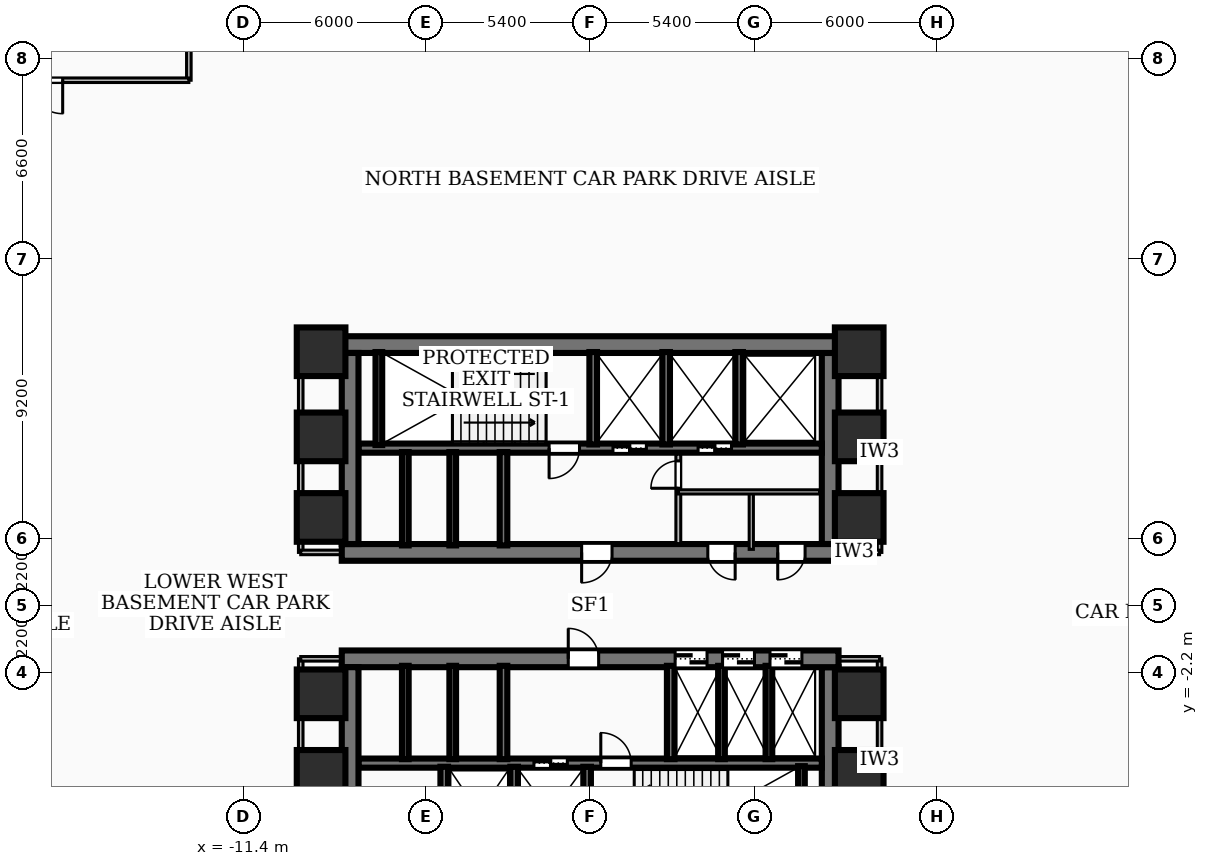
"""IFC4 building model, lengths in metres.
Left out: names, types, materials, properties, quantities, classifications, styles, units other than length and angle.
Written with IfcOpenShell. Run it as: python <this file> out.ifc"""

import sys

from ifc_helpers import new_model, si_unit, direction, frame, frame_2d, origin, origin_2d, place, context, subcontext, project, spatial, rectangle, extrude, element, fill, save


model = new_model("IFC4")
c1 = context("Model", 3, precision=1e-05, world=origin(), true_north=direction((0.0, 1.0)))
c2 = subcontext(c1, "Body", "Model", "MODEL_VIEW")
j1 = project(units=[si_unit("LENGTHUNIT", "METRE"), si_unit("PLANEANGLEUNIT", "RADIAN")], contexts=[c1])
p1 = place(None, origin())
s1 = spatial("IfcSite", under=j1, at=p1, CompositionType="ELEMENT")
p2 = place(p1, origin())
s2 = spatial("IfcBuilding", under=s1, at=p2, CompositionType="ELEMENT")
p3 = place(p2, frame((0.0, 0.0, -4.5)))
s3 = spatial("IfcBuildingStorey", under=s2, at=p3, CompositionType="ELEMENT", Elevation=-4.5)
p4 = place(p3, frame((-8.78, 8.585, 0.0), z_axis=(0.0, 0.0, 1.0), x_axis=(1.0, 0.0, 0.0)))
e1 = element("IfcWall", 1, at=p4, inside=s3, PredefinedType="SHEAR", context=c2, shape_type="SweptSolid", body=[
    extrude(rectangle(XDim=17.56, YDim=0.55, at=frame_2d((8.78, 0.0))), origin(), (0.0, 0.0, 1.0), 4.18),
])
p5 = place(p3, frame((8.17, 1.75, 0.0), z_axis=(0.0, 0.0, 1.0), x_axis=(-1.0, 0.0, 0.0)))
e2 = element("IfcWall", 2, at=p5, inside=s3, PredefinedType="SHEAR", context=c2, shape_type="SweptSolid", body=[
    extrude(rectangle(XDim=16.34, YDim=0.55, at=frame_2d((8.17, 0.0))), origin(), (0.0, 0.0, 1.0), 4.18),
])
p6 = place(p5, frame((7.45, 0.0, 0.0)))
e3 = element("IfcOpeningElement", 3, at=p6, cuts=e2, PredefinedType="OPENING", context=c2, shape_type="SweptSolid", body=[
    extrude(rectangle(XDim=1.0, YDim=2.1, at=frame_2d((0.5, 1.05))), frame((0.0, 0.285, 0.0), z_axis=(0.0, -1.0, 0.0), x_axis=(1.0, 0.0, 0.0)), (0.0, 0.0, 1.0), 0.57),
])
p7 = place(p5, frame((3.4, 0.0, 0.0)))
e4 = element("IfcOpeningElement", 4, at=p7, cuts=e2, PredefinedType="OPENING", context=c2, shape_type="SweptSolid", body=[
    extrude(rectangle(XDim=0.9, YDim=2.06, at=frame_2d((0.45, 1.03))), frame((0.0, 0.285, 0.0), z_axis=(0.0, -1.0, 0.0), x_axis=(1.0, 0.0, 0.0)), (0.0, 0.0, 1.0), 0.57),
])
p8 = place(p5, frame((1.1, 0.0, 0.0)))
e5 = element("IfcOpeningElement", 5, at=p8, cuts=e2, PredefinedType="OPENING", context=c2, shape_type="SweptSolid", body=[
    extrude(rectangle(XDim=0.9, YDim=2.06, at=frame_2d((0.45, 1.03))), frame((0.0, 0.285, 0.0), z_axis=(0.0, -1.0, 0.0), x_axis=(1.0, 0.0, 0.0)), (0.0, 0.0, 1.0), 0.57),
])
for number, where, z_axis, x_axis in (
    (6, (-7.895, 2.025, 0.0), (0.0, 0.0, 1.0), (0.0, 1.0, 0.0)),
    (7, (7.895, 8.31, 0.0), (0.0, 0.0, 1.0), (0.0, -1.0, 0.0)),
):
    element("IfcWall", number, at=place(p3, frame(where, z_axis=z_axis, x_axis=x_axis)), inside=s3, PredefinedType="SHEAR", context=c2, shape_type="SweptSolid", body=[
        extrude(rectangle(XDim=6.285, YDim=0.55, at=frame_2d((3.143, 0.0))), origin(), (0.0, 0.0, 1.0), 4.18),
    ])
p9 = place(p3, frame((7.62, 5.18, 0.0), z_axis=(0.0, 0.0, 1.0), x_axis=(-1.0, 0.0, 0.0)))
e8 = element("IfcWall", 8, at=p9, inside=s3, PredefinedType="SOLIDWALL", context=c2, shape_type="SweptSolid", body=[
    extrude(rectangle(XDim=15.24, YDim=0.3, at=frame_2d((7.62, 0.0))), origin(), (0.0, 0.0, 1.0), 4.18),
])
p10 = place(p9, frame((5.77, 0.0, 0.0)))
e9 = element("IfcOpeningElement", 9, at=p10, cuts=e8, PredefinedType="OPENING", context=c2, shape_type="SweptSolid", body=[
    extrude(rectangle(XDim=1.1, YDim=2.15, at=frame_2d((0.55, 1.075))), frame((0.0, 0.16, 0.0), z_axis=(0.0, -1.0, 0.0), x_axis=(1.0, 0.0, 0.0)), (0.0, 0.0, 1.0), 0.32),
])
p11 = place(p9, frame((2.97, 0.0, 0.0)))
e10 = element("IfcOpeningElement", 10, at=p11, cuts=e8, PredefinedType="OPENING", context=c2, shape_type="SweptSolid", body=[
    extrude(rectangle(XDim=1.1, YDim=2.15, at=frame_2d((0.55, 1.075))), frame((0.0, 0.16, 0.0), z_axis=(0.0, -1.0, 0.0), x_axis=(1.0, 0.0, 0.0)), (0.0, 0.0, 1.0), 0.32),
])
p12 = place(p9, frame((7.97, 0.0, 0.0)))
e11 = element("IfcOpeningElement", 11, at=p12, cuts=e8, PredefinedType="OPENING", context=c2, shape_type="SweptSolid", body=[
    extrude(rectangle(XDim=1.0, YDim=2.1, at=frame_2d((0.5, 1.05))), frame((0.0, 0.16, 0.0), z_axis=(0.0, -1.0, 0.0), x_axis=(1.0, 0.0, 0.0)), (0.0, 0.0, 1.0), 0.32),
])
p13 = place(p3, frame((-8.17, -1.75, 0.0), z_axis=(0.0, 0.0, 1.0), x_axis=(1.0, 0.0, 0.0)))
e12 = element("IfcWall", 12, at=p13, inside=s3, PredefinedType="SHEAR", context=c2, shape_type="SweptSolid", body=[
    extrude(rectangle(XDim=16.34, YDim=0.55, at=frame_2d((8.17, 0.0))), origin(), (0.0, 0.0, 1.0), 4.18),
])
p14 = place(p13, frame((7.45, 0.0, 0.0)))
e13 = element("IfcOpeningElement", 13, at=p14, cuts=e12, PredefinedType="OPENING", context=c2, shape_type="SweptSolid", body=[
    extrude(rectangle(XDim=1.0, YDim=2.1, at=frame_2d((0.5, 1.05))), frame((0.0, 0.285, 0.0), z_axis=(0.0, -1.0, 0.0), x_axis=(1.0, 0.0, 0.0)), (0.0, 0.0, 1.0), 0.57),
])
p15 = place(p13, frame((10.965, 0.0, 0.0)))
e14 = element("IfcOpeningElement", 14, at=p15, cuts=e12, PredefinedType="OPENING", context=c2, shape_type="SweptSolid", body=[
    extrude(rectangle(XDim=1.05, YDim=2.15, at=frame_2d((0.525, 1.075))), frame((0.0, 0.285, 0.0), z_axis=(0.0, -1.0, 0.0), x_axis=(1.0, 0.0, 0.0)), (0.0, 0.0, 1.0), 0.57),
])
p16 = place(p13, frame((12.525, 0.0, 0.0)))
e15 = element("IfcOpeningElement", 15, at=p16, cuts=e12, PredefinedType="OPENING", context=c2, shape_type="SweptSolid", body=[
    extrude(rectangle(XDim=1.05, YDim=2.15, at=frame_2d((0.525, 1.075))), frame((0.0, 0.285, 0.0), z_axis=(0.0, -1.0, 0.0), x_axis=(1.0, 0.0, 0.0)), (0.0, 0.0, 1.0), 0.57),
])
p17 = place(p13, frame((14.085, 0.0, 0.0)))
e16 = element("IfcOpeningElement", 16, at=p17, cuts=e12, PredefinedType="OPENING", context=c2, shape_type="SweptSolid", body=[
    extrude(rectangle(XDim=1.05, YDim=2.15, at=frame_2d((0.525, 1.075))), frame((0.0, 0.285, 0.0), z_axis=(0.0, -1.0, 0.0), x_axis=(1.0, 0.0, 0.0)), (0.0, 0.0, 1.0), 0.57),
])
for number, where, z_axis, x_axis in (
    (17, (-7.895, -8.31, 0.0), (0.0, 0.0, 1.0), (0.0, 1.0, 0.0)),
    (18, (7.895, -2.025, 0.0), (0.0, 0.0, 1.0), (0.0, -1.0, 0.0)),
):
    element("IfcWall", number, at=place(p3, frame(where, z_axis=z_axis, x_axis=x_axis)), inside=s3, PredefinedType="SHEAR", context=c2, shape_type="SweptSolid", body=[
        extrude(rectangle(XDim=6.285, YDim=0.55, at=frame_2d((3.143, 0.0))), origin(), (0.0, 0.0, 1.0), 4.18),
    ])
p18 = place(p3, frame((-7.62, -5.18, 0.0), z_axis=(0.0, 0.0, 1.0), x_axis=(1.0, 0.0, 0.0)))
e19 = element("IfcWall", 19, at=p18, inside=s3, PredefinedType="SOLIDWALL", context=c2, shape_type="SweptSolid", body=[
    extrude(rectangle(XDim=15.24, YDim=0.3, at=frame_2d((7.62, 0.0))), origin(), (0.0, 0.0, 1.0), 4.18),
])
p19 = place(p18, frame((5.77, 0.0, 0.0)))
e20 = element("IfcOpeningElement", 20, at=p19, cuts=e19, PredefinedType="OPENING", context=c2, shape_type="SweptSolid", body=[
    extrude(rectangle(XDim=1.1, YDim=2.15, at=frame_2d((0.55, 1.075))), frame((0.0, 0.16, 0.0), z_axis=(0.0, -1.0, 0.0), x_axis=(1.0, 0.0, 0.0)), (0.0, 0.0, 1.0), 0.32),
])
p20 = place(p18, frame((7.97, 0.0, 0.0)))
e21 = element("IfcOpeningElement", 21, at=p20, cuts=e19, PredefinedType="OPENING", context=c2, shape_type="SweptSolid", body=[
    extrude(rectangle(XDim=1.0, YDim=2.1, at=frame_2d((0.5, 1.05))), frame((0.0, 0.16, 0.0), z_axis=(0.0, -1.0, 0.0), x_axis=(1.0, 0.0, 0.0)), (0.0, 0.0, 1.0), 0.32),
])
for number, where, z_axis, x_axis in (
    (22, (-6.95, 5.28, 0.0), (0.0, 0.0, 1.0), (0.0, 1.0, 0.0)),
    (23, (6.95, -8.34, 0.0), (0.0, 0.0, 1.0), (0.0, 1.0, 0.0)),
):
    element("IfcWall", number, at=place(p3, frame(where, z_axis=z_axis, x_axis=x_axis)), inside=s3, PredefinedType="SOLIDWALL", context=c2, shape_type="SweptSolid", body=[
        extrude(rectangle(XDim=3.06, YDim=0.22, at=frame_2d((1.53, 0.0))), origin(), (0.0, 0.0, 1.0), 4.18),
    ])
for number, where, z_axis, x_axis in (
    (24, (0.1, 5.3, 0.0), (0.0, 0.0, 1.0), (0.0, 1.0, 0.0)),
    (25, (2.5, 5.3, 0.0), (0.0, 0.0, 1.0), (0.0, 1.0, 0.0)),
    (26, (4.9, 5.3, 0.0), (0.0, 0.0, 1.0), (0.0, 1.0, 0.0)),
):
    element("IfcWall", number, at=place(p3, frame(where, z_axis=z_axis, x_axis=x_axis)), inside=s3, PredefinedType="SOLIDWALL", context=c2, shape_type="SweptSolid", body=[
        extrude(rectangle(XDim=3.04, YDim=0.25, at=frame_2d((1.52, 0.0))), origin(), (0.0, 0.0, 1.0), 4.18),
    ])
p21 = place(p3, frame((-2.85, 1.98, 0.0), z_axis=(0.0, 0.0, 1.0), x_axis=(0.0, 1.0, 0.0)))
e27 = element("IfcWall", 27, at=p21, inside=s3, PredefinedType="SOLIDWALL", context=c2, shape_type="SweptSolid", body=[
    extrude(rectangle(XDim=3.07, YDim=0.25, at=frame_2d((1.535, 0.0))), origin(), (0.0, 0.0, 1.0), 4.18),
])
for number, where, z_axis, x_axis in (
    (28, (-0.1, -8.34, 0.0), (0.0, 0.0, 1.0), (0.0, 1.0, 0.0)),
    (29, (-2.5, -8.34, 0.0), (0.0, 0.0, 1.0), (0.0, 1.0, 0.0)),
    (30, (-4.8, -8.34, 0.0), (0.0, 0.0, 1.0), (0.0, 1.0, 0.0)),
):
    element("IfcWall", number, at=place(p3, frame(where, z_axis=z_axis, x_axis=x_axis)), inside=s3, PredefinedType="SOLIDWALL", context=c2, shape_type="SweptSolid", body=[
        extrude(rectangle(XDim=3.04, YDim=0.25, at=frame_2d((1.52, 0.0))), origin(), (0.0, 0.0, 1.0), 4.18),
    ])
for number, where, z_axis, x_axis in (
    (31, (-2.85, -5.05, 0.0), (0.0, 0.0, 1.0), (0.0, 1.0, 0.0)),
    (32, (2.65, -5.05, 0.0), (0.0, 0.0, 1.0), (0.0, 1.0, 0.0)),
):
    element("IfcWall", number, at=place(p3, frame(where, z_axis=z_axis, x_axis=x_axis)), inside=s3, PredefinedType="SOLIDWALL", context=c2, shape_type="SweptSolid", body=[
        extrude(rectangle(XDim=3.07, YDim=0.25, at=frame_2d((1.535, 0.0))), origin(), (0.0, 0.0, 1.0), 4.18),
    ])
for number, where, z_axis, x_axis in (
    (33, (-6.08, 1.98, 0.0), (0.0, 0.0, 1.0), (0.0, 1.0, 0.0)),
    (34, (-4.52, 1.98, 0.0), (0.0, 0.0, 1.0), (0.0, 1.0, 0.0)),
    (35, (4.32, -5.05, 0.0), (0.0, 0.0, 1.0), (0.0, 1.0, 0.0)),
    (36, (5.88, -5.05, 0.0), (0.0, 0.0, 1.0), (0.0, 1.0, 0.0)),
    (37, (-6.08, -5.05, 0.0), (0.0, 0.0, 1.0), (0.0, 1.0, 0.0)),
    (38, (-4.52, -5.05, 0.0), (0.0, 0.0, 1.0), (0.0, 1.0, 0.0)),
):
    element("IfcWall", number, at=place(p3, frame(where, z_axis=z_axis, x_axis=x_axis)), inside=s3, PredefinedType="SOLIDWALL", context=c2, shape_type="SweptSolid", body=[
        extrude(rectangle(XDim=3.07, YDim=0.22, at=frame_2d((1.535, 0.0))), origin(), (0.0, 0.0, 1.0), 4.18),
    ])
for number, where, z_axis, x_axis in (
    (39, (-8.85, -5.55, 0.0), (0.0, 0.0, 1.0), (1.0, 0.0, 0.0)),
    (40, (-8.85, -2.9, 0.0), (0.0, 0.0, 1.0), (1.0, 0.0, 0.0)),
    (41, (-8.85, 2.9, 0.0), (0.0, 0.0, 1.0), (1.0, 0.0, 0.0)),
    (42, (-8.85, 5.55, 0.0), (0.0, 0.0, 1.0), (1.0, 0.0, 0.0)),
    (43, (8.85, -5.55, 0.0), (0.0, 0.0, 1.0), (1.0, 0.0, 0.0)),
    (44, (8.85, -2.9, 0.0), (0.0, 0.0, 1.0), (1.0, 0.0, 0.0)),
    (45, (8.85, 2.9, 0.0), (0.0, 0.0, 1.0), (1.0, 0.0, 0.0)),
    (46, (8.85, 5.55, 0.0), (0.0, 0.0, 1.0), (1.0, 0.0, 0.0)),
    (47, (-8.85, 8.35, 0.0), (0.0, 0.0, 1.0), (1.0, 0.0, 0.0)),
    (48, (8.85, 8.35, 0.0), (0.0, 0.0, 1.0), (1.0, 0.0, 0.0)),
):
    element("IfcColumn", number, at=place(p3, frame(where, z_axis=z_axis, x_axis=x_axis)), inside=s3, PredefinedType="COLUMN", context=c2, shape_type="SweptSolid", body=[
        extrude(rectangle(XDim=1.6, YDim=1.6, at=origin_2d()), origin(), (0.0, 0.0, 1.0), 4.5),
    ])
p22 = place(p3, frame((2.9, 2.04, 0.0), z_axis=(0.0, 0.0, 1.0), x_axis=(0.0, 1.0, 0.0)))
e49 = element("IfcWall", 49, at=p22, inside=s3, PredefinedType="PARTITIONING", context=c2, shape_type="SweptSolid", body=[
    extrude(rectangle(XDim=2.94, YDim=0.16, at=frame_2d((1.47, 0.0))), origin(), (0.0, 0.0, 1.0), 3.245),
])
p23 = place(p22, frame((1.82, 0.0, 0.0)))
e50 = element("IfcOpeningElement", 50, at=p23, cuts=e49, PredefinedType="OPENING", context=c2, shape_type="SweptSolid", body=[
    extrude(rectangle(XDim=0.9, YDim=2.06, at=frame_2d((0.45, 1.03))), frame((0.0, 0.09, 0.0), z_axis=(0.0, -1.0, 0.0), x_axis=(1.0, 0.0, 0.0)), (0.0, 0.0, 1.0), 0.18),
])
p24 = place(p3, frame((2.9, 3.74, 0.0), z_axis=(0.0, 0.0, 1.0), x_axis=(1.0, 0.0, 0.0)))
e51 = element("IfcWall", 51, at=p24, inside=s3, PredefinedType="PARTITIONING", context=c2, shape_type="SweptSolid", body=[
    extrude(rectangle(XDim=4.65, YDim=0.138, at=frame_2d((2.325, 0.0))), origin(), (0.0, 0.0, 1.0), 4.18),
])
p25 = place(p3, frame((5.3, 1.85, 0.0), z_axis=(0.0, 0.0, 1.0), x_axis=(0.0, 1.0, 0.0)))
e52 = element("IfcWall", 52, at=p25, inside=s3, PredefinedType="PARTITIONING", context=c2, shape_type="SweptSolid", body=[
    extrude(rectangle(XDim=1.89, YDim=0.138, at=frame_2d((0.945, 0.0))), origin(), (0.0, 0.0, 1.0), 3.245),
])
p26 = place(p3, frame((-9.52, 1.75, 0.0), z_axis=(0.0, 0.0, 1.0), x_axis=(0.0, 1.0, 0.0)))
e53 = element("IfcWall", 53, at=p26, inside=s3, PredefinedType="PARTITIONING", context=c2, shape_type="SweptSolid", body=[
    extrude(rectangle(XDim=6.63, YDim=0.15, at=frame_2d((3.315, 0.0))), origin(), (0.0, 0.0, 1.0), 3.072),
])
p27 = place(p3, frame((-7.85, 1.75, 0.0), z_axis=(0.0, 0.0, 1.0), x_axis=(-1.0, 0.0, 0.0)))
e54 = element("IfcWall", 54, at=p27, inside=s3, PredefinedType="PARTITIONING", context=c2, shape_type="SweptSolid", body=[
    extrude(rectangle(XDim=1.67, YDim=0.15, at=frame_2d((0.835, 0.0))), origin(), (0.0, 0.0, 1.0), 3.245),
])
p28 = place(p3, frame((-9.52, -8.38, 0.0), z_axis=(0.0, 0.0, 1.0), x_axis=(0.0, 1.0, 0.0)))
e55 = element("IfcWall", 55, at=p28, inside=s3, PredefinedType="PARTITIONING", context=c2, shape_type="SweptSolid", body=[
    extrude(rectangle(XDim=6.63, YDim=0.15, at=frame_2d((3.315, 0.0))), origin(), (0.0, 0.0, 1.0), 3.072),
])
p29 = place(p3, frame((-7.85, -1.75, 0.0), z_axis=(0.0, 0.0, 1.0), x_axis=(-1.0, 0.0, 0.0)))
e56 = element("IfcWall", 56, at=p29, inside=s3, PredefinedType="PARTITIONING", context=c2, shape_type="SweptSolid", body=[
    extrude(rectangle(XDim=1.67, YDim=0.15, at=frame_2d((0.835, 0.0))), origin(), (0.0, 0.0, 1.0), 3.245),
])
p30 = place(p3, frame((9.52, 1.75, 0.0), z_axis=(0.0, 0.0, 1.0), x_axis=(0.0, 1.0, 0.0)))
e57 = element("IfcWall", 57, at=p30, inside=s3, PredefinedType="PARTITIONING", context=c2, shape_type="SweptSolid", body=[
    extrude(rectangle(XDim=6.63, YDim=0.15, at=frame_2d((3.315, 0.0))), origin(), (0.0, 0.0, 1.0), 3.072),
])
p31 = place(p3, frame((7.85, 1.75, 0.0), z_axis=(0.0, 0.0, 1.0), x_axis=(1.0, 0.0, 0.0)))
e58 = element("IfcWall", 58, at=p31, inside=s3, PredefinedType="PARTITIONING", context=c2, shape_type="SweptSolid", body=[
    extrude(rectangle(XDim=1.67, YDim=0.15, at=frame_2d((0.835, 0.0))), origin(), (0.0, 0.0, 1.0), 3.245),
])
p32 = place(p3, frame((9.52, -8.38, 0.0), z_axis=(0.0, 0.0, 1.0), x_axis=(0.0, 1.0, 0.0)))
e59 = element("IfcWall", 59, at=p32, inside=s3, PredefinedType="PARTITIONING", context=c2, shape_type="SweptSolid", body=[
    extrude(rectangle(XDim=6.63, YDim=0.15, at=frame_2d((3.315, 0.0))), origin(), (0.0, 0.0, 1.0), 3.072),
])
p33 = place(p3, frame((7.85, -1.75, 0.0), z_axis=(0.0, 0.0, 1.0), x_axis=(1.0, 0.0, 0.0)))
e60 = element("IfcWall", 60, at=p33, inside=s3, PredefinedType="PARTITIONING", context=c2, shape_type="SweptSolid", body=[
    extrude(rectangle(XDim=1.67, YDim=0.15, at=frame_2d((0.835, 0.0))), origin(), (0.0, 0.0, 1.0), 3.245),
])
p34 = place(p3, frame((-13.2, 17.28, 0.0), z_axis=(0.0, 0.0, 1.0), x_axis=(-1.0, 0.0, 0.0)))
e61 = element("IfcWall", 61, at=p34, inside=s3, PredefinedType="PARTITIONING", context=c2, shape_type="SweptSolid", body=[
    extrude(rectangle(XDim=9.4, YDim=0.15, at=frame_2d((4.7, 0.0))), origin(), (0.0, 0.0, 1.0), 4.18),
])
p35 = place(p34, frame((4.15, 0.0, 0.0)))
e62 = element("IfcOpeningElement", 62, at=p35, cuts=e61, PredefinedType="OPENING", context=c2, shape_type="SweptSolid", body=[
    extrude(rectangle(XDim=1.1, YDim=2.15, at=frame_2d((0.55, 1.075))), frame((0.0, 0.085, 0.0), z_axis=(0.0, -1.0, 0.0), x_axis=(1.0, 0.0, 0.0)), (0.0, 0.0, 1.0), 0.17),
])
p36 = place(p3, frame((-13.2, 17.28, 0.0), z_axis=(0.0, 0.0, 1.0), x_axis=(0.0, 1.0, 0.0)))
e63 = element("IfcWall", 63, at=p36, inside=s3, PredefinedType="PARTITIONING", context=c2, shape_type="SweptSolid", body=[
    extrude(rectangle(XDim=8.52, YDim=0.15, at=frame_2d((4.26, 0.0))), origin(), (0.0, 0.0, 1.0), 3.072),
])
p37 = place(p6, origin())
e64 = element("IfcDoor", 64, at=p37, inside=s3, OperationType="SINGLE_SWING_RIGHT", PredefinedType="DOOR", context=c2, shape_type="SweptSolid", body=[
    extrude(rectangle(XDim=1.0, YDim=2.1, at=frame_2d((0.5, 1.05))), frame((0.0, 0.025, 0.0), z_axis=(0.0, -1.0, 0.0), x_axis=(1.0, 0.0, 0.0)), (0.0, 0.0, 1.0), 0.05),
])
fill(e3, e64)
p38 = place(p14, origin())
e65 = element("IfcDoor", 65, at=p38, inside=s3, OperationType="SINGLE_SWING_LEFT", PredefinedType="DOOR", context=c2, shape_type="SweptSolid", body=[
    extrude(rectangle(XDim=1.0, YDim=2.1, at=frame_2d((0.5, 1.05))), frame((0.0, 0.025, 0.0), z_axis=(0.0, -1.0, 0.0), x_axis=(1.0, 0.0, 0.0)), (0.0, 0.0, 1.0), 0.05),
])
fill(e13, e65)
p39 = place(p10, origin())
e66 = element("IfcDoor", 66, at=p39, inside=s3, OperationType="DOUBLE_DOOR_SLIDING", PredefinedType="DOOR", context=c2, shape_type="SweptSolid", body=[
    extrude(rectangle(XDim=1.1, YDim=2.15, at=frame_2d((0.55, 1.075))), frame((0.0, 0.025, 0.0), z_axis=(0.0, -1.0, 0.0), x_axis=(1.0, 0.0, 0.0)), (0.0, 0.0, 1.0), 0.05),
])
fill(e9, e66)
p40 = place(p11, origin())
e67 = element("IfcDoor", 67, at=p40, inside=s3, OperationType="DOUBLE_DOOR_SLIDING", PredefinedType="DOOR", context=c2, shape_type="SweptSolid", body=[
    extrude(rectangle(XDim=1.1, YDim=2.15, at=frame_2d((0.55, 1.075))), frame((0.0, 0.025, 0.0), z_axis=(0.0, -1.0, 0.0), x_axis=(1.0, 0.0, 0.0)), (0.0, 0.0, 1.0), 0.05),
])
fill(e10, e67)
p41 = place(p12, origin())
e68 = element("IfcDoor", 68, at=p41, inside=s3, OperationType="SINGLE_SWING_RIGHT", PredefinedType="DOOR", context=c2, shape_type="SweptSolid", body=[
    extrude(rectangle(XDim=1.0, YDim=2.1, at=frame_2d((0.5, 1.05))), frame((0.0, 0.025, 0.0), z_axis=(0.0, -1.0, 0.0), x_axis=(1.0, 0.0, 0.0)), (0.0, 0.0, 1.0), 0.05),
])
fill(e11, e68)
p42 = place(p19, origin())
e69 = element("IfcDoor", 69, at=p42, inside=s3, OperationType="DOUBLE_DOOR_SLIDING", PredefinedType="DOOR", context=c2, shape_type="SweptSolid", body=[
    extrude(rectangle(XDim=1.1, YDim=2.15, at=frame_2d((0.55, 1.075))), frame((0.0, 0.025, 0.0), z_axis=(0.0, -1.0, 0.0), x_axis=(1.0, 0.0, 0.0)), (0.0, 0.0, 1.0), 0.05),
])
fill(e20, e69)
p43 = place(p20, origin())
e70 = element("IfcDoor", 70, at=p43, inside=s3, OperationType="SINGLE_SWING_LEFT", PredefinedType="DOOR", context=c2, shape_type="SweptSolid", body=[
    extrude(rectangle(XDim=1.0, YDim=2.1, at=frame_2d((0.5, 1.05))), frame((0.0, 0.025, 0.0), z_axis=(0.0, -1.0, 0.0), x_axis=(1.0, 0.0, 0.0)), (0.0, 0.0, 1.0), 0.05),
])
fill(e21, e70)
p44 = place(p15, origin())
e71 = element("IfcDoor", 71, at=p44, inside=s3, OperationType="DOUBLE_DOOR_SLIDING", PredefinedType="DOOR", context=c2, shape_type="SweptSolid", body=[
    extrude(rectangle(XDim=1.05, YDim=2.15, at=frame_2d((0.525, 1.075))), frame((0.0, 0.025, 0.0), z_axis=(0.0, -1.0, 0.0), x_axis=(1.0, 0.0, 0.0)), (0.0, 0.0, 1.0), 0.05),
])
fill(e14, e71)
p45 = place(p16, origin())
e72 = element("IfcDoor", 72, at=p45, inside=s3, OperationType="DOUBLE_DOOR_SLIDING", PredefinedType="DOOR", context=c2, shape_type="SweptSolid", body=[
    extrude(rectangle(XDim=1.05, YDim=2.15, at=frame_2d((0.525, 1.075))), frame((0.0, 0.025, 0.0), z_axis=(0.0, -1.0, 0.0), x_axis=(1.0, 0.0, 0.0)), (0.0, 0.0, 1.0), 0.05),
])
fill(e15, e72)
p46 = place(p17, origin())
e73 = element("IfcDoor", 73, at=p46, inside=s3, OperationType="DOUBLE_DOOR_SLIDING", PredefinedType="DOOR", context=c2, shape_type="SweptSolid", body=[
    extrude(rectangle(XDim=1.05, YDim=2.15, at=frame_2d((0.525, 1.075))), frame((0.0, 0.025, 0.0), z_axis=(0.0, -1.0, 0.0), x_axis=(1.0, 0.0, 0.0)), (0.0, 0.0, 1.0), 0.05),
])
fill(e16, e73)
p47 = place(p7, origin())
e74 = element("IfcDoor", 74, at=p47, inside=s3, OperationType="SINGLE_SWING_LEFT", PredefinedType="DOOR", context=c2, shape_type="SweptSolid", body=[
    extrude(rectangle(XDim=0.9, YDim=2.06, at=frame_2d((0.45, 1.03))), frame((0.0, 0.025, 0.0), z_axis=(0.0, -1.0, 0.0), x_axis=(1.0, 0.0, 0.0)), (0.0, 0.0, 1.0), 0.05),
])
fill(e4, e74)
p48 = place(p8, origin())
e75 = element("IfcDoor", 75, at=p48, inside=s3, OperationType="SINGLE_SWING_RIGHT", PredefinedType="DOOR", context=c2, shape_type="SweptSolid", body=[
    extrude(rectangle(XDim=0.9, YDim=2.06, at=frame_2d((0.45, 1.03))), frame((0.0, 0.025, 0.0), z_axis=(0.0, -1.0, 0.0), x_axis=(1.0, 0.0, 0.0)), (0.0, 0.0, 1.0), 0.05),
])
fill(e5, e75)
p49 = place(p23, origin())
e76 = element("IfcDoor", 76, at=p49, inside=s3, OperationType="SINGLE_SWING_LEFT", PredefinedType="DOOR", context=c2, shape_type="SweptSolid", body=[
    extrude(rectangle(XDim=0.9, YDim=2.06, at=frame_2d((0.45, 1.03))), frame((0.0, 0.025, 0.0), z_axis=(0.0, -1.0, 0.0), x_axis=(1.0, 0.0, 0.0)), (0.0, 0.0, 1.0), 0.05),
])
fill(e50, e76)
p50 = place(p35, origin())
e77 = element("IfcDoor", 77, at=p50, inside=s3, OperationType="SINGLE_SWING_LEFT", PredefinedType="DOOR", context=c2, shape_type="SweptSolid", body=[
    extrude(rectangle(XDim=1.1, YDim=2.15, at=frame_2d((0.55, 1.075))), frame((0.0, 0.025, 0.0), z_axis=(0.0, -1.0, 0.0), x_axis=(1.0, 0.0, 0.0)), (0.0, 0.0, 1.0), 0.05),
])
fill(e62, e77)
save(model, sys.argv[1])
